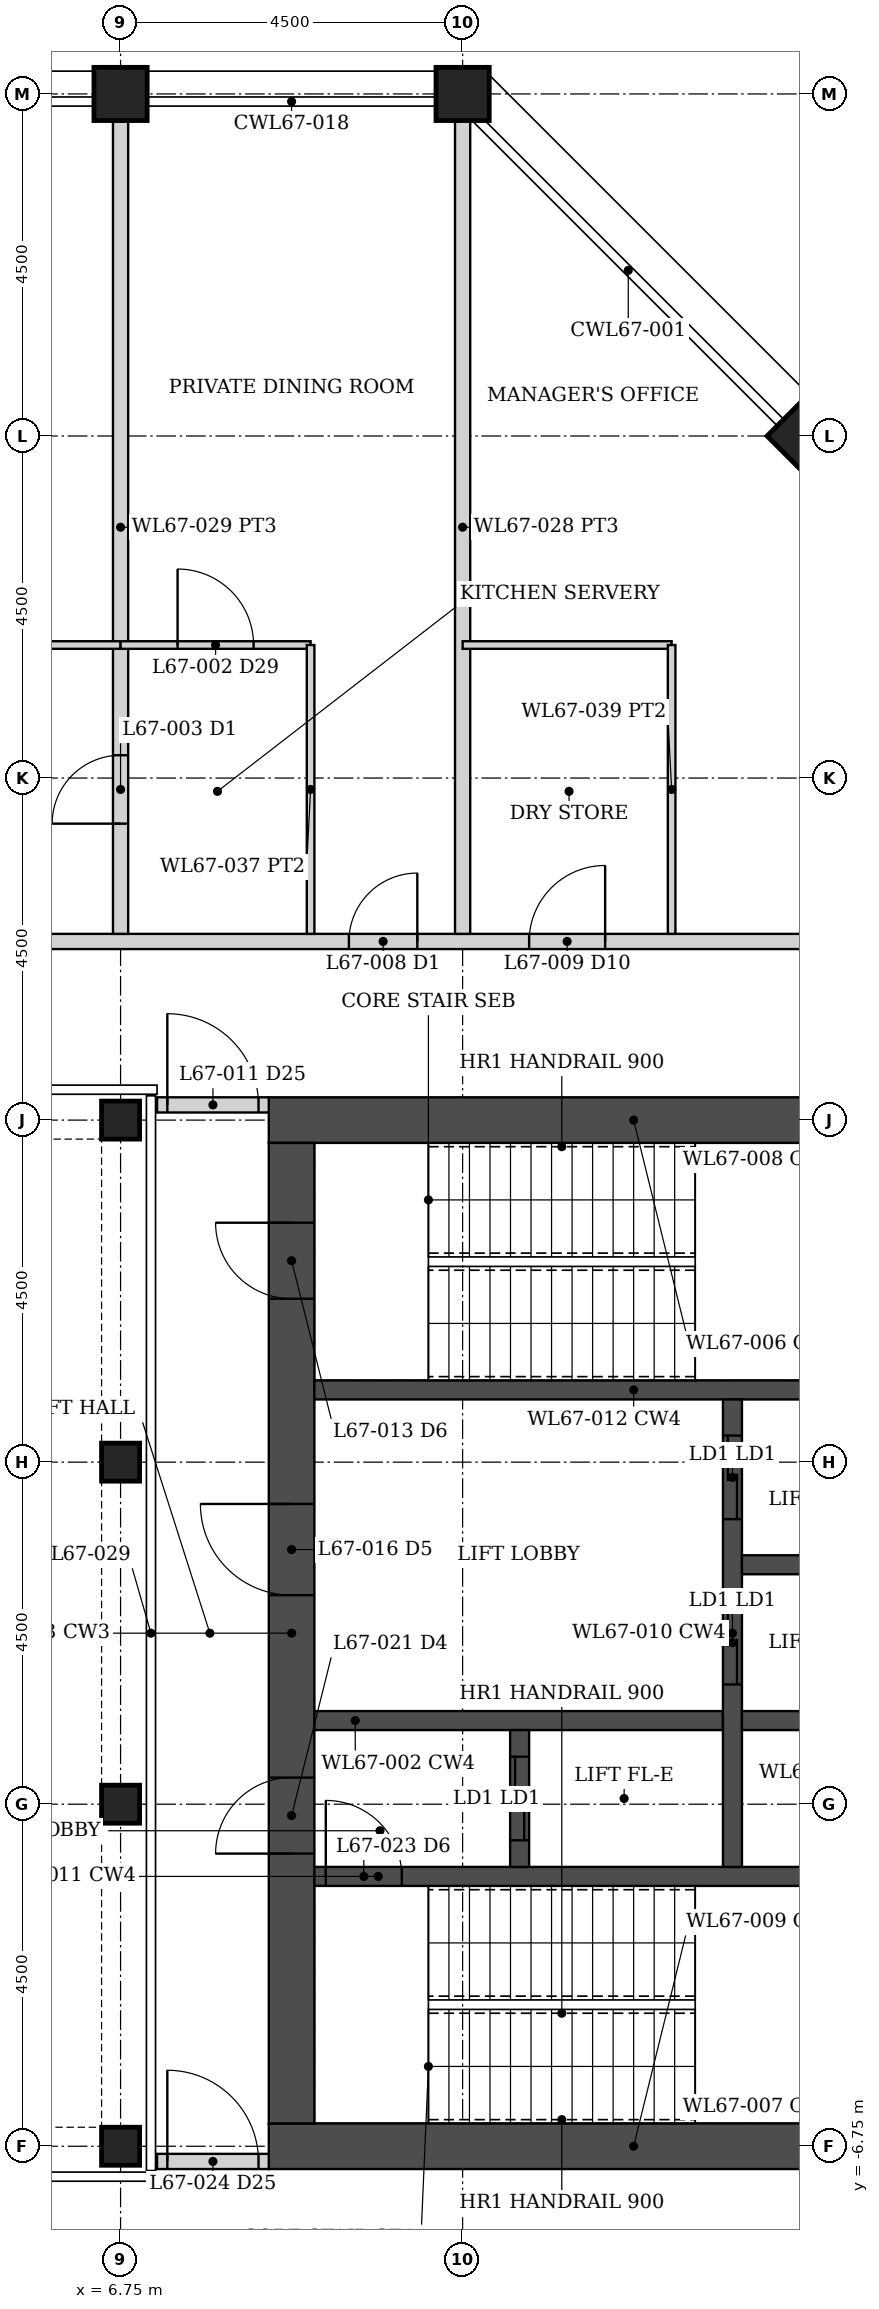
"""IFC4 building model, lengths in metres.
Left out: names, types, materials, properties, quantities, classifications, styles, units other than length and angle.
Written with IfcOpenShell. Run it as: python <this file> out.ifc"""

import sys

from ifc_helpers import new_model, si_unit, direction, frame, frame_2d, origin, origin_2d, place, context, subcontext, project, spatial, rectangle, hollow_rectangle, extrude, element, fill, save


model = new_model("IFC4")
c1 = context("Model", 3, precision=1e-05, world=origin(), true_north=direction((0.0, 1.0)))
c2 = subcontext(c1, "Body", "Model", "MODEL_VIEW")
j1 = project(units=[si_unit("LENGTHUNIT", "METRE"), si_unit("PLANEANGLEUNIT", "RADIAN")], contexts=[c1])
p1 = place(None, origin())
s1 = spatial("IfcSite", under=j1, at=p1, CompositionType="ELEMENT")
p2 = place(p1, origin())
s2 = spatial("IfcBuilding", under=s1, at=p2, CompositionType="ELEMENT")
p3 = place(p2, frame((0.0, 0.0, 257.05)))
s3 = spatial("IfcBuildingStorey", under=s2, at=p3, CompositionType="ELEMENT", Elevation=257.05)
for number, where, z_axis, x_axis in (
    (1, (6.75, 20.25, 0.0), (0.0, 0.0, 1.0), (0.0, 1.0, 0.0)),
    (2, (11.25, 20.25, 0.0), (0.0, 0.0, 1.0), (0.0, 1.0, 0.0)),
    (3, (15.75, 15.75, 0.0), (0.0, 0.0, 1.0), (0.707, 0.707, 0.0)),
):
    element("IfcColumn", number, at=place(p3, frame(where, z_axis=z_axis, x_axis=x_axis)), inside=s3, PredefinedType="COLUMN", context=c2, shape_type="SweptSolid", body=[
        extrude(hollow_rectangle(XDim=0.7, YDim=0.7, WallThickness=0.035, at=origin_2d()), origin(), (0.0, 0.0, 1.0), 5.0),
    ])
for number, where, z_axis, x_axis in (
    (4, (6.75, -6.75, 0.0), (0.0, 0.0, 1.0), (1.0, 0.0, 0.0)),
    (5, (6.75, -2.25, 0.0), (0.0, 0.0, 1.0), (1.0, 0.0, 0.0)),
    (6, (6.75, 2.25, 0.0), (0.0, 0.0, 1.0), (1.0, 0.0, 0.0)),
    (7, (6.75, 6.75, 0.0), (0.0, 0.0, 1.0), (1.0, 0.0, 0.0)),
):
    element("IfcColumn", number, at=place(p3, frame(where, z_axis=z_axis, x_axis=x_axis)), inside=s3, PredefinedType="COLUMN", context=c2, shape_type="SweptSolid", body=[
        extrude(hollow_rectangle(XDim=0.5, YDim=0.5, WallThickness=0.025, at=origin_2d()), origin(), (0.0, 0.0, 1.0), 5.0),
    ])
for number, where, z_axis, x_axis in (
    (8, (8.7, -6.75, 0.0), (0.0, 0.0, 1.0), (1.0, 0.0, 0.0)),
    (9, (8.7, 6.75, 0.0), (0.0, 0.0, 1.0), (1.0, 0.0, 0.0)),
):
    element("IfcWall", number, at=place(p3, frame(where, z_axis=z_axis, x_axis=x_axis)), inside=s3, PredefinedType="SHEAR", context=c2, shape_type="SweptSolid", body=[
        extrude(rectangle(XDim=9.6, YDim=0.6, at=frame_2d((4.8, 0.0))), origin(), (0.0, 0.0, 1.0), 5.0),
    ])
p4 = place(p3, frame((9.0, -6.45, 0.0), z_axis=(0.0, 0.0, 1.0), x_axis=(0.0, 1.0, 0.0)))
e10 = element("IfcWall", 10, at=p4, inside=s3, PredefinedType="SHEAR", context=c2, shape_type="SweptSolid", body=[
    extrude(rectangle(XDim=12.9, YDim=0.6, at=frame_2d((6.45, 0.0))), origin(), (0.0, 0.0, 1.0), 5.0),
])
p5 = place(p4, frame((3.55, 0.0, 0.0)))
e11 = element("IfcOpeningElement", 11, at=p5, cuts=e10, PredefinedType="OPENING", context=c2, shape_type="SweptSolid", body=[
    extrude(rectangle(XDim=1.0, YDim=2.1, at=frame_2d((0.5, 1.05))), frame((0.0, 0.31, 0.0), z_axis=(0.0, -1.0, 0.0), x_axis=(1.0, 0.0, 0.0)), (0.0, 0.0, 1.0), 0.62),
])
p6 = place(p4, frame((6.95, 0.0, 0.0)))
e12 = element("IfcOpeningElement", 12, at=p6, cuts=e10, PredefinedType="OPENING", context=c2, shape_type="SweptSolid", body=[
    extrude(rectangle(XDim=1.2, YDim=2.1, at=frame_2d((0.6, 1.05))), frame((0.0, 0.31, 0.0), z_axis=(0.0, -1.0, 0.0), x_axis=(1.0, 0.0, 0.0)), (0.0, 0.0, 1.0), 0.62),
])
p7 = place(p4, frame((10.85, 0.0, 0.0)))
e13 = element("IfcOpeningElement", 13, at=p7, cuts=e10, PredefinedType="OPENING", context=c2, shape_type="SweptSolid", body=[
    extrude(rectangle(XDim=1.0, YDim=2.1, at=frame_2d((0.5, 1.05))), frame((0.0, 0.31, 0.0), z_axis=(0.0, -1.0, 0.0), x_axis=(1.0, 0.0, 0.0)), (0.0, 0.0, 1.0), 0.62),
])
p8 = place(p3, frame((9.3, -3.2, 0.0), z_axis=(0.0, 0.0, 1.0), x_axis=(1.0, 0.0, 0.0)))
e14 = element("IfcWall", 14, at=p8, inside=s3, PredefinedType="SHEAR", context=c2, shape_type="SweptSolid", body=[
    extrude(rectangle(XDim=8.4, YDim=0.25, at=frame_2d((4.2, 0.0))), origin(), (0.0, 0.0, 1.0), 5.0),
])
p9 = place(p8, frame((0.15, 0.0, 0.0)))
e15 = element("IfcOpeningElement", 15, at=p9, cuts=e14, PredefinedType="OPENING", context=c2, shape_type="SweptSolid", body=[
    extrude(rectangle(XDim=1.0, YDim=2.1, at=frame_2d((0.5, 1.05))), frame((0.0, 0.135, 0.0), z_axis=(0.0, -1.0, 0.0), x_axis=(1.0, 0.0, 0.0)), (0.0, 0.0, 1.0), 0.27),
])
p10 = place(p3, frame((9.3, 3.2, 0.0), z_axis=(0.0, 0.0, 1.0), x_axis=(1.0, 0.0, 0.0)))
e16 = element("IfcWall", 16, at=p10, inside=s3, PredefinedType="SHEAR", context=c2, shape_type="SweptSolid", body=[
    extrude(rectangle(XDim=8.4, YDim=0.25, at=frame_2d((4.2, 0.0))), origin(), (0.0, 0.0, 1.0), 5.0),
])
p11 = place(p3, frame((9.3, -1.15, 0.0), z_axis=(0.0, 0.0, 1.0), x_axis=(1.0, 0.0, 0.0)))
e17 = element("IfcWall", 17, at=p11, inside=s3, PredefinedType="SHEAR", context=c2, shape_type="SweptSolid", body=[
    extrude(rectangle(XDim=5.375, YDim=0.25, at=frame_2d((2.688, 0.0))), origin(), (0.0, 0.0, 1.0), 5.0),
])
p12 = place(p3, frame((12.0, -3.075, 0.0), z_axis=(0.0, 0.0, 1.0), x_axis=(0.0, 1.0, 0.0)))
e18 = element("IfcWall", 18, at=p12, inside=s3, PredefinedType="SHEAR", context=c2, shape_type="SweptSolid", body=[
    extrude(rectangle(XDim=1.8, YDim=0.25, at=frame_2d((0.9, 0.0))), origin(), (0.0, 0.0, 1.0), 5.0),
])
p13 = place(p12, frame((0.35, 0.0, 0.0)))
e19 = element("IfcOpeningElement", 19, at=p13, cuts=e18, PredefinedType="OPENING", context=c2, shape_type="SweptSolid", body=[
    extrude(rectangle(XDim=1.1, YDim=2.1, at=frame_2d((0.55, 1.05))), frame((0.0, 0.135, 0.0), z_axis=(0.0, -1.0, 0.0), x_axis=(1.0, 0.0, 0.0)), (0.0, 0.0, 1.0), 0.27),
])
p14 = place(p3, frame((14.8, -3.075, 0.0), z_axis=(0.0, 0.0, 1.0), x_axis=(0.0, 1.0, 0.0)))
e20 = element("IfcWall", 20, at=p14, inside=s3, PredefinedType="SHEAR", context=c2, shape_type="SweptSolid", body=[
    extrude(rectangle(XDim=6.15, YDim=0.25, at=frame_2d((3.075, 0.0))), origin(), (0.0, 0.0, 1.0), 5.0),
])
p15 = place(p14, frame((2.4, 0.0, 0.0)))
e21 = element("IfcOpeningElement", 21, at=p15, cuts=e20, PredefinedType="OPENING", context=c2, shape_type="SweptSolid", body=[
    extrude(rectangle(XDim=1.1, YDim=2.1, at=frame_2d((0.55, 1.05))), frame((0.0, 0.135, 0.0), z_axis=(0.0, -1.0, 0.0), x_axis=(1.0, 0.0, 0.0)), (0.0, 0.0, 1.0), 0.27),
])
p16 = place(p14, frame((4.575, 0.0, 0.0)))
e22 = element("IfcOpeningElement", 22, at=p16, cuts=e20, PredefinedType="OPENING", context=c2, shape_type="SweptSolid", body=[
    extrude(rectangle(XDim=1.1, YDim=2.1, at=frame_2d((0.55, 1.05))), frame((0.0, 0.135, 0.0), z_axis=(0.0, -1.0, 0.0), x_axis=(1.0, 0.0, 0.0)), (0.0, 0.0, 1.0), 0.27),
])
for number, where, z_axis, x_axis in (
    (23, (14.925, -1.15, 0.0), (0.0, 0.0, 1.0), (1.0, 0.0, 0.0)),
    (24, (14.925, 0.9, 0.0), (0.0, 0.0, 1.0), (1.0, 0.0, 0.0)),
):
    element("IfcWall", number, at=place(p3, frame(where, z_axis=z_axis, x_axis=x_axis)), inside=s3, PredefinedType="SHEAR", context=c2, shape_type="SweptSolid", body=[
        extrude(rectangle(XDim=2.775, YDim=0.25, at=frame_2d((1.387, 0.0))), origin(), (0.0, 0.0, 1.0), 5.0),
    ])
p17 = place(p3, frame((7.23, 6.95, 0.0), z_axis=(0.0, 0.0, 1.0), x_axis=(1.0, 0.0, 0.0)))
e25 = element("IfcWall", 25, at=p17, inside=s3, PredefinedType="PARTITIONING", context=c2, shape_type="SweptSolid", body=[
    extrude(rectangle(XDim=1.47, YDim=0.2, at=frame_2d((0.735, 0.0))), origin(), (0.0, 0.0, 1.0), 3.823),
])
p18 = place(p17, frame((0.135, 0.0, 0.0)))
e26 = element("IfcOpeningElement", 26, at=p18, cuts=e25, PredefinedType="OPENING", context=c2, shape_type="SweptSolid", body=[
    extrude(rectangle(XDim=1.2, YDim=2.1, at=frame_2d((0.6, 1.05))), frame((0.0, 0.11, 0.0), z_axis=(0.0, -1.0, 0.0), x_axis=(1.0, 0.0, 0.0)), (0.0, 0.0, 1.0), 0.22),
])
p19 = place(p3, frame((7.23, -6.95, 0.0), z_axis=(0.0, 0.0, 1.0), x_axis=(1.0, 0.0, 0.0)))
e27 = element("IfcWall", 27, at=p19, inside=s3, PredefinedType="PARTITIONING", context=c2, shape_type="SweptSolid", body=[
    extrude(rectangle(XDim=1.47, YDim=0.2, at=frame_2d((0.735, 0.0))), origin(), (0.0, 0.0, 1.0), 3.823),
])
p20 = place(p19, frame((0.135, 0.0, 0.0)))
e28 = element("IfcOpeningElement", 28, at=p20, cuts=e27, PredefinedType="OPENING", context=c2, shape_type="SweptSolid", body=[
    extrude(rectangle(XDim=1.2, YDim=2.1, at=frame_2d((0.6, 1.05))), frame((0.0, 0.11, 0.0), z_axis=(0.0, -1.0, 0.0), x_axis=(1.0, 0.0, 0.0)), (0.0, 0.0, 1.0), 0.22),
])
p21 = place(p3, frame((-20.025, 9.1, 0.0), z_axis=(0.0, 0.0, 1.0), x_axis=(1.0, 0.0, 0.0)))
e29 = element("IfcWall", 29, at=p21, inside=s3, PredefinedType="PARTITIONING", context=c2, shape_type="SweptSolid", body=[
    extrude(rectangle(XDim=40.05, YDim=0.2, at=frame_2d((20.025, 0.0))), origin(), (0.0, 0.0, 1.0), 3.823),
])
p22 = place(p21, frame((6.3, 0.0, 0.0)))
e30 = element("IfcOpeningElement", 30, at=p22, cuts=e29, PredefinedType="OPENING", context=c2, shape_type="SweptSolid", body=[
    extrude(rectangle(XDim=0.9, YDim=2.1, at=frame_2d((0.45, 1.05))), frame((0.0, 0.11, 0.0), z_axis=(0.0, -1.0, 0.0), x_axis=(1.0, 0.0, 0.0)), (0.0, 0.0, 1.0), 0.22),
])
p23 = place(p21, frame((13.772, 0.0, 0.0)))
e31 = element("IfcOpeningElement", 31, at=p23, cuts=e29, PredefinedType="OPENING", context=c2, shape_type="SweptSolid", body=[
    extrude(rectangle(XDim=1.8, YDim=2.1, at=frame_2d((0.9, 1.05))), frame((0.0, 0.11, 0.0), z_axis=(0.0, -1.0, 0.0), x_axis=(1.0, 0.0, 0.0)), (0.0, 0.0, 1.0), 0.22),
])
p24 = place(p21, frame((16.9, 0.0, 0.0)))
e32 = element("IfcOpeningElement", 32, at=p24, cuts=e29, PredefinedType="OPENING", context=c2, shape_type="SweptSolid", body=[
    extrude(rectangle(XDim=1.0, YDim=2.1, at=frame_2d((0.5, 1.05))), frame((0.0, 0.11, 0.0), z_axis=(0.0, -1.0, 0.0), x_axis=(1.0, 0.0, 0.0)), (0.0, 0.0, 1.0), 0.22),
])
p25 = place(p21, frame((22.025, 0.0, 0.0)))
e33 = element("IfcOpeningElement", 33, at=p25, cuts=e29, PredefinedType="OPENING", context=c2, shape_type="SweptSolid", body=[
    extrude(rectangle(XDim=1.5, YDim=2.1, at=frame_2d((0.75, 1.05))), frame((0.0, 0.11, 0.0), z_axis=(0.0, -1.0, 0.0), x_axis=(1.0, 0.0, 0.0)), (0.0, 0.0, 1.0), 0.22),
])
p26 = place(p21, frame((29.779, 0.0, 0.0)))
e34 = element("IfcOpeningElement", 34, at=p26, cuts=e29, PredefinedType="OPENING", context=c2, shape_type="SweptSolid", body=[
    extrude(rectangle(XDim=0.9, YDim=2.1, at=frame_2d((0.45, 1.05))), frame((0.0, 0.11, 0.0), z_axis=(0.0, -1.0, 0.0), x_axis=(1.0, 0.0, 0.0)), (0.0, 0.0, 1.0), 0.22),
])
p27 = place(p21, frame((36.436, 0.0, 0.0)))
e35 = element("IfcOpeningElement", 35, at=p27, cuts=e29, PredefinedType="OPENING", context=c2, shape_type="SweptSolid", body=[
    extrude(rectangle(XDim=0.9, YDim=2.1, at=frame_2d((0.45, 1.05))), frame((0.0, 0.11, 0.0), z_axis=(0.0, -1.0, 0.0), x_axis=(1.0, 0.0, 0.0)), (0.0, 0.0, 1.0), 0.22),
])
p28 = place(p21, frame((32.15, 0.0, 0.0)))
e36 = element("IfcOpeningElement", 36, at=p28, cuts=e29, PredefinedType="OPENING", context=c2, shape_type="SweptSolid", body=[
    extrude(rectangle(XDim=1.0, YDim=2.1, at=frame_2d((0.5, 1.05))), frame((0.0, 0.11, 0.0), z_axis=(0.0, -1.0, 0.0), x_axis=(1.0, 0.0, 0.0)), (0.0, 0.0, 1.0), 0.22),
])
p29 = place(p3, frame((6.75, 9.2, 0.0), z_axis=(0.0, 0.0, 1.0), x_axis=(0.0, 1.0, 0.0)))
e37 = element("IfcWall", 37, at=p29, inside=s3, PredefinedType="PARTITIONING", context=c2, shape_type="SweptSolid", body=[
    extrude(rectangle(XDim=10.7, YDim=0.2, at=frame_2d((5.35, 0.0))), origin(), (0.0, 0.0, 1.0), 3.823),
])
p30 = place(p29, frame((1.45, 0.0, 0.0)))
e38 = element("IfcOpeningElement", 38, at=p30, cuts=e37, PredefinedType="OPENING", context=c2, shape_type="SweptSolid", body=[
    extrude(rectangle(XDim=0.9, YDim=2.1, at=frame_2d((0.45, 1.05))), frame((0.0, 0.11, 0.0), z_axis=(0.0, -1.0, 0.0), x_axis=(1.0, 0.0, 0.0)), (0.0, 0.0, 1.0), 0.22),
])
p31 = place(p3, frame((11.25, 9.2, 0.0), z_axis=(0.0, 0.0, 1.0), x_axis=(0.0, 1.0, 0.0)))
e39 = element("IfcWall", 39, at=p31, inside=s3, PredefinedType="PARTITIONING", context=c2, shape_type="SweptSolid", body=[
    extrude(rectangle(XDim=10.7, YDim=0.2, at=frame_2d((5.35, 0.0))), origin(), (0.0, 0.0, 1.0), 3.823),
])
p32 = place(p3, frame((-4.0, 13.0, 0.0), z_axis=(0.0, 0.0, 1.0), x_axis=(1.0, 0.0, 0.0)))
e40 = element("IfcWall", 40, at=p32, inside=s3, PredefinedType="PARTITIONING", context=c2, shape_type="SweptSolid", body=[
    extrude(rectangle(XDim=10.75, YDim=0.1, at=frame_2d((5.375, 0.0))), origin(), (0.0, 0.0, 1.0), 3.823),
])
p33 = place(p32, frame((6.0, 0.0, 0.0)))
e41 = element("IfcOpeningElement", 41, at=p33, cuts=e40, PredefinedType="OPENING", context=c2, shape_type="SweptSolid", body=[
    extrude(rectangle(XDim=1.5, YDim=2.1, at=frame_2d((0.75, 1.05))), frame((0.0, 0.06, 0.0), z_axis=(0.0, -1.0, 0.0), x_axis=(1.0, 0.0, 0.0)), (0.0, 0.0, 1.0), 0.12),
])
p34 = place(p3, frame((6.75, 13.0, 0.0), z_axis=(0.0, 0.0, 1.0), x_axis=(1.0, 0.0, 0.0)))
e42 = element("IfcWall", 42, at=p34, inside=s3, PredefinedType="PARTITIONING", context=c2, shape_type="SweptSolid", body=[
    extrude(rectangle(XDim=2.5, YDim=0.1, at=frame_2d((1.25, 0.0))), origin(), (0.0, 0.0, 1.0), 3.823),
])
p35 = place(p34, frame((0.75, 0.0, 0.0)))
e43 = element("IfcOpeningElement", 43, at=p35, cuts=e42, PredefinedType="OPENING", context=c2, shape_type="SweptSolid", body=[
    extrude(rectangle(XDim=1.0, YDim=2.1, at=frame_2d((0.5, 1.05))), frame((0.0, 0.06, 0.0), z_axis=(0.0, -1.0, 0.0), x_axis=(1.0, 0.0, 0.0)), (0.0, 0.0, 1.0), 0.12),
])
p36 = place(p3, frame((9.25, 9.2, 0.0), z_axis=(0.0, 0.0, 1.0), x_axis=(0.0, 1.0, 0.0)))
e44 = element("IfcWall", 44, at=p36, inside=s3, PredefinedType="PARTITIONING", context=c2, shape_type="SweptSolid", body=[
    extrude(rectangle(XDim=3.8, YDim=0.1, at=frame_2d((1.9, 0.0))), origin(), (0.0, 0.0, 1.0), 3.823),
])
p37 = place(p3, frame((11.25, 13.0, 0.0), z_axis=(0.0, 0.0, 1.0), x_axis=(1.0, 0.0, 0.0)))
e45 = element("IfcWall", 45, at=p37, inside=s3, PredefinedType="PARTITIONING", context=c2, shape_type="SweptSolid", body=[
    extrude(rectangle(XDim=2.75, YDim=0.1, at=frame_2d((1.375, 0.0))), origin(), (0.0, 0.0, 1.0), 3.823),
])
p38 = place(p3, frame((14.0, 9.2, 0.0), z_axis=(0.0, 0.0, 1.0), x_axis=(0.0, 1.0, 0.0)))
e46 = element("IfcWall", 46, at=p38, inside=s3, PredefinedType="PARTITIONING", context=c2, shape_type="SweptSolid", body=[
    extrude(rectangle(XDim=3.8, YDim=0.1, at=frame_2d((1.9, 0.0))), origin(), (0.0, 0.0, 1.0), 3.823),
])
p39 = place(p18, origin())
e47 = element("IfcDoor", 47, at=p39, inside=s3, OperationType="DOUBLE_DOOR_DOUBLE_SWING", PredefinedType="DOOR", context=c2, shape_type="SweptSolid", body=[
    extrude(rectangle(XDim=1.2, YDim=2.1, at=frame_2d((0.6, 1.05))), frame((0.0, 0.025, 0.0), z_axis=(0.0, -1.0, 0.0), x_axis=(1.0, 0.0, 0.0)), (0.0, 0.0, 1.0), 0.05),
])
fill(e26, e47)
p40 = place(p20, origin())
e48 = element("IfcDoor", 48, at=p40, inside=s3, OperationType="DOUBLE_DOOR_DOUBLE_SWING", PredefinedType="DOOR", context=c2, shape_type="SweptSolid", body=[
    extrude(rectangle(XDim=1.2, YDim=2.1, at=frame_2d((0.6, 1.05))), frame((0.0, 0.025, 0.0), z_axis=(0.0, -1.0, 0.0), x_axis=(1.0, 0.0, 0.0)), (0.0, 0.0, 1.0), 0.05),
])
fill(e28, e48)
p41 = place(p26, origin())
e49 = element("IfcDoor", 49, at=p41, inside=s3, OperationType="SINGLE_SWING_RIGHT", PredefinedType="DOOR", context=c2, shape_type="SweptSolid", body=[
    extrude(rectangle(XDim=0.9, YDim=2.1, at=frame_2d((0.45, 1.05))), frame((0.0, 0.025, 0.0), z_axis=(0.0, -1.0, 0.0), x_axis=(1.0, 0.0, 0.0)), (0.0, 0.0, 1.0), 0.05),
])
fill(e34, e49)
p42 = place(p35, origin())
e50 = element("IfcDoor", 50, at=p42, inside=s3, OperationType="SINGLE_SWING_LEFT", PredefinedType="DOOR", context=c2, shape_type="SweptSolid", body=[
    extrude(rectangle(XDim=1.0, YDim=2.1, at=frame_2d((0.5, 1.05))), frame((0.0, 0.025, 0.0), z_axis=(0.0, -1.0, 0.0), x_axis=(1.0, 0.0, 0.0)), (0.0, 0.0, 1.0), 0.05),
])
fill(e43, e50)
p43 = place(p30, origin())
e51 = element("IfcDoor", 51, at=p43, inside=s3, OperationType="SINGLE_SWING_LEFT", PredefinedType="DOOR", context=c2, shape_type="SweptSolid", body=[
    extrude(rectangle(XDim=0.9, YDim=2.1, at=frame_2d((0.45, 1.05))), frame((0.0, 0.025, 0.0), z_axis=(0.0, -1.0, 0.0), x_axis=(1.0, 0.0, 0.0)), (0.0, 0.0, 1.0), 0.05),
])
fill(e38, e51)
p44 = place(p28, origin())
e52 = element("IfcDoor", 52, at=p44, inside=s3, OperationType="SINGLE_SWING_RIGHT", PredefinedType="DOOR", context=c2, shape_type="SweptSolid", body=[
    extrude(rectangle(XDim=1.0, YDim=2.1, at=frame_2d((0.5, 1.05))), frame((0.0, 0.025, 0.0), z_axis=(0.0, -1.0, 0.0), x_axis=(1.0, 0.0, 0.0)), (0.0, 0.0, 1.0), 0.05),
])
fill(e36, e52)
p45 = place(p5, origin())
e53 = element("IfcDoor", 53, at=p45, inside=s3, OperationType="SINGLE_SWING_LEFT", PredefinedType="DOOR", context=c2, shape_type="SweptSolid", body=[
    extrude(rectangle(XDim=1.0, YDim=2.1, at=frame_2d((0.5, 1.05))), frame((0.0, 0.025, 0.0), z_axis=(0.0, -1.0, 0.0), x_axis=(1.0, 0.0, 0.0)), (0.0, 0.0, 1.0), 0.05),
])
fill(e11, e53)
p46 = place(p9, origin())
e54 = element("IfcDoor", 54, at=p46, inside=s3, OperationType="SINGLE_SWING_LEFT", PredefinedType="DOOR", context=c2, shape_type="SweptSolid", body=[
    extrude(rectangle(XDim=1.0, YDim=2.1, at=frame_2d((0.5, 1.05))), frame((0.0, 0.025, 0.0), z_axis=(0.0, -1.0, 0.0), x_axis=(1.0, 0.0, 0.0)), (0.0, 0.0, 1.0), 0.05),
])
fill(e15, e54)
p47 = place(p6, origin())
e55 = element("IfcDoor", 55, at=p47, inside=s3, OperationType="SINGLE_SWING_RIGHT", PredefinedType="DOOR", context=c2, shape_type="SweptSolid", body=[
    extrude(rectangle(XDim=1.2, YDim=2.1, at=frame_2d((0.6, 1.05))), frame((0.0, 0.025, 0.0), z_axis=(0.0, -1.0, 0.0), x_axis=(1.0, 0.0, 0.0)), (0.0, 0.0, 1.0), 0.05),
])
fill(e12, e55)
p48 = place(p7, origin())
e56 = element("IfcDoor", 56, at=p48, inside=s3, OperationType="SINGLE_SWING_RIGHT", PredefinedType="DOOR", context=c2, shape_type="SweptSolid", body=[
    extrude(rectangle(XDim=1.0, YDim=2.1, at=frame_2d((0.5, 1.05))), frame((0.0, 0.025, 0.0), z_axis=(0.0, -1.0, 0.0), x_axis=(1.0, 0.0, 0.0)), (0.0, 0.0, 1.0), 0.05),
])
fill(e13, e56)
p49 = place(p13, origin())
e57 = element("IfcDoor", 57, at=p49, inside=s3, OperationType="DOUBLE_DOOR_SLIDING", PredefinedType="DOOR", context=c2, shape_type="SweptSolid", body=[
    extrude(rectangle(XDim=1.1, YDim=2.1, at=frame_2d((0.55, 1.05))), frame((0.0, 0.025, 0.0), z_axis=(0.0, -1.0, 0.0), x_axis=(1.0, 0.0, 0.0)), (0.0, 0.0, 1.0), 0.05),
])
fill(e19, e57)
p50 = place(p15, origin())
e58 = element("IfcDoor", 58, at=p50, inside=s3, OperationType="DOUBLE_DOOR_SLIDING", PredefinedType="DOOR", context=c2, shape_type="SweptSolid", body=[
    extrude(rectangle(XDim=1.1, YDim=2.1, at=frame_2d((0.55, 1.05))), frame((0.0, 0.025, 0.0), z_axis=(0.0, -1.0, 0.0), x_axis=(1.0, 0.0, 0.0)), (0.0, 0.0, 1.0), 0.05),
])
fill(e21, e58)
p51 = place(p16, origin())
e59 = element("IfcDoor", 59, at=p51, inside=s3, OperationType="DOUBLE_DOOR_SLIDING", PredefinedType="DOOR", context=c2, shape_type="SweptSolid", body=[
    extrude(rectangle(XDim=1.1, YDim=2.1, at=frame_2d((0.55, 1.05))), frame((0.0, 0.025, 0.0), z_axis=(0.0, -1.0, 0.0), x_axis=(1.0, 0.0, 0.0)), (0.0, 0.0, 1.0), 0.05),
])
fill(e22, e59)
save(model, sys.argv[1])
